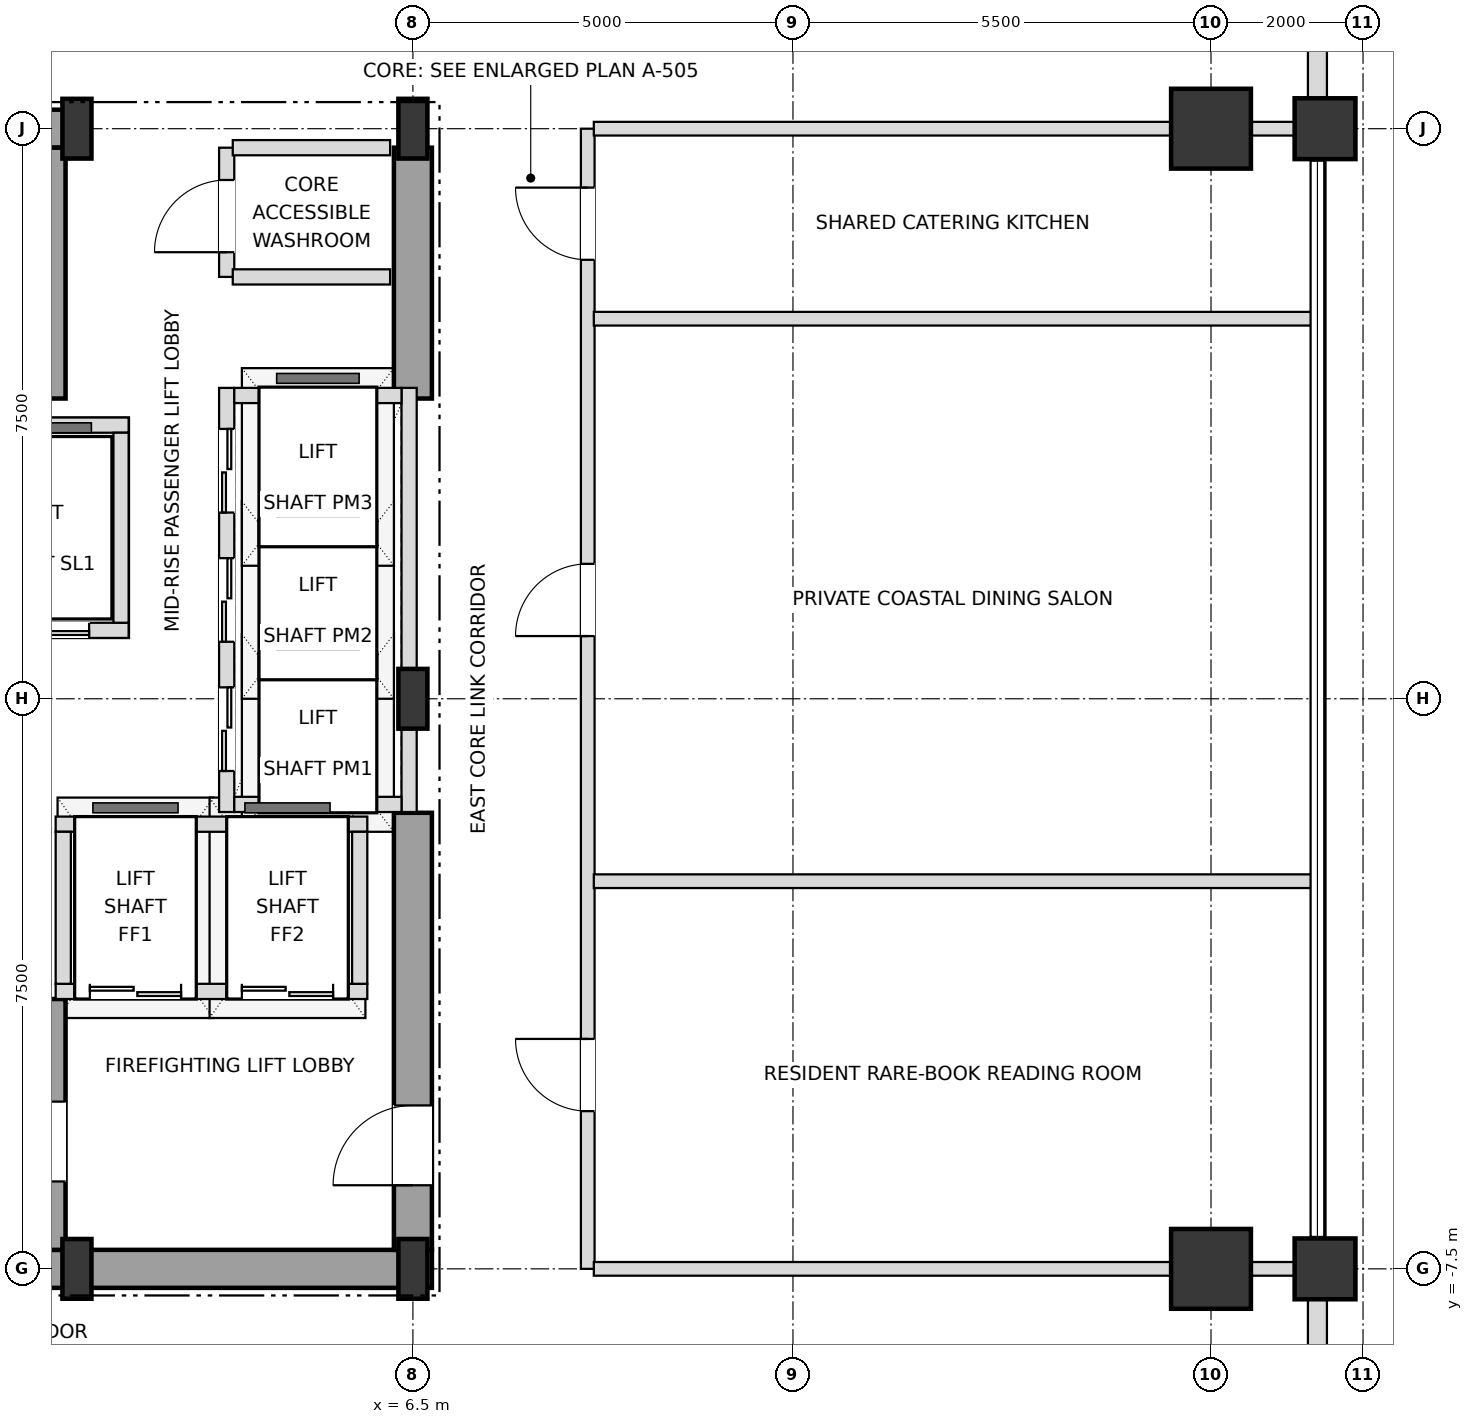
"""IFC4 building model, lengths in metres.
Left out: names, types, materials, properties, quantities, classifications, styles, units other than length and angle.
Written with IfcOpenShell. Run it as: python <this file> out.ifc"""

import sys

from ifc_helpers import new_model, si_unit, direction, frame, frame_2d, origin, origin_2d, place, context, subcontext, project, spatial, rectangle, i_section, extrude, element, fill, save


model = new_model("IFC4")
c1 = context("Model", 3, precision=1e-05, world=origin(), true_north=direction((0.0, 1.0)))
c2 = subcontext(c1, "Body", "Model", "MODEL_VIEW")
j1 = project(units=[si_unit("LENGTHUNIT", "METRE"), si_unit("PLANEANGLEUNIT", "RADIAN")], contexts=[c1])
p1 = place(None, origin())
s1 = spatial("IfcSite", under=j1, at=p1, CompositionType="ELEMENT")
p2 = place(p1, origin())
s2 = spatial("IfcBuilding", under=s1, at=p2, CompositionType="ELEMENT")
p3 = place(p2, frame((0.0, 0.0, 205.2)))
s3 = spatial("IfcBuildingStorey", under=s2, at=p3, CompositionType="ELEMENT", Elevation=205.2)
for number, where, z_axis, x_axis in (
    (1, (2.08, -7.5, 0.0), (0.0, 0.0, 1.0), (1.0, 0.0, 0.0)),
    (2, (6.5, -7.5, 0.0), (0.0, 0.0, 1.0), (1.0, 0.0, 0.0)),
    (3, (6.5, 0.0, 0.0), (0.0, 0.0, 1.0), (1.0, 0.0, 0.0)),
    (4, (2.08, 7.5, 0.0), (0.0, 0.0, 1.0), (1.0, 0.0, 0.0)),
    (5, (6.5, 7.5, 0.0), (0.0, 0.0, 1.0), (1.0, 0.0, 0.0)),
):
    element("IfcColumn", number, at=place(p3, frame(where, z_axis=z_axis, x_axis=x_axis)), inside=s3, PredefinedType="COLUMN", context=c2, shape_type="SweptSolid", body=[
        extrude(i_section(OverallWidth=0.382, OverallDepth=0.786, WebThickness=0.02, FlangeThickness=0.033, at=origin_2d()), origin(), (0.0, 0.0, 1.0), 3.6),
    ])
for number, where, z_axis, x_axis in (
    (6, (17.0, -7.5, 0.0), (0.0, 0.0, 1.0), (1.0, 0.0, 0.0)),
    (7, (17.0, 7.5, 0.0), (0.0, 0.0, 1.0), (1.0, 0.0, 0.0)),
):
    element("IfcColumn", number, at=place(p3, frame(where, z_axis=z_axis, x_axis=x_axis)), inside=s3, PredefinedType="USERDEFINED", context=c2, shape_type="SweptSolid", body=[
        extrude(rectangle(XDim=1.05, YDim=1.05, at=origin_2d()), origin(), (0.0, 0.0, 1.0), 3.6),
    ])
for number, where, z_axis, x_axis in (
    (8, (18.5, -7.5, 0.0), (0.0, 0.0, 1.0), (1.0, 0.0, 0.0)),
    (9, (18.5, 7.5, 0.0), (0.0, 0.0, 1.0), (1.0, 0.0, 0.0)),
):
    element("IfcColumn", number, at=place(p3, frame(where, z_axis=z_axis, x_axis=x_axis)), inside=s3, PredefinedType="COLUMN", context=c2, shape_type="SweptSolid", body=[
        extrude(rectangle(XDim=0.8, YDim=0.8, at=origin_2d()), origin(), (0.0, 0.0, 1.0), 3.6),
    ])
p4 = place(p3, frame((18.4, -12.605, 0.0), z_axis=(0.0, 0.0, 1.0), x_axis=(0.0, 1.0, 0.0)))
e10 = element("IfcWall", 10, at=p4, inside=s3, PredefinedType="SOLIDWALL", context=c2, shape_type="SweptSolid", body=[
    extrude(rectangle(XDim=4.71, YDim=0.25, at=frame_2d((2.355, 0.0))), origin(), (0.0, 0.0, 1.0), 2.748),
])
p5 = place(p4, frame((1.455, 0.0, 0.72)))
e11 = element("IfcOpeningElement", 11, at=p5, cuts=e10, PredefinedType="OPENING", context=c2, shape_type="SweptSolid", body=[
    extrude(rectangle(XDim=1.8, YDim=1.68, at=frame_2d((0.9, 0.84))), frame((0.0, 0.135, 0.0), z_axis=(0.0, -1.0, 0.0), x_axis=(1.0, 0.0, 0.0)), (0.0, 0.0, 1.0), 0.27),
])
p6 = place(p3, frame((18.4, 7.895, 0.0), z_axis=(0.0, 0.0, 1.0), x_axis=(0.0, 1.0, 0.0)))
e12 = element("IfcWall", 12, at=p6, inside=s3, PredefinedType="SOLIDWALL", context=c2, shape_type="SweptSolid", body=[
    extrude(rectangle(XDim=4.71, YDim=0.25, at=frame_2d((2.355, 0.0))), origin(), (0.0, 0.0, 1.0), 2.748),
])
p7 = place(p6, frame((1.455, 0.0, 0.72)))
e13 = element("IfcOpeningElement", 13, at=p7, cuts=e12, PredefinedType="OPENING", context=c2, shape_type="SweptSolid", body=[
    extrude(rectangle(XDim=1.8, YDim=1.68, at=frame_2d((0.9, 0.84))), frame((0.0, 0.135, 0.0), z_axis=(0.0, -1.0, 0.0), x_axis=(1.0, 0.0, 0.0)), (0.0, 0.0, 1.0), 0.27),
])
p8 = place(p3, frame((0.0, -7.5, 0.0), z_axis=(0.0, 0.0, 1.0), x_axis=(1.0, 0.0, 0.0)))
e14 = element("IfcWall", 14, at=p8, inside=s3, PredefinedType="SHEAR", context=c2, shape_type="SweptSolid", body=[
    extrude(rectangle(XDim=6.75, YDim=0.5, at=frame_2d((3.375, 0.0))), origin(), (0.0, 0.0, 1.0), 3.38),
])
p9 = place(p3, frame((0.0, 7.5, 0.0), z_axis=(0.0, 0.0, 1.0), x_axis=(1.0, 0.0, 0.0)))
e15 = element("IfcWall", 15, at=p9, inside=s3, PredefinedType="SHEAR", context=c2, shape_type="SweptSolid", body=[
    extrude(rectangle(XDim=2.08, YDim=0.5, at=frame_2d((1.04, 0.0))), origin(), (0.0, 0.0, 1.0), 3.38),
])
p10 = place(p3, frame((6.5, -7.25, 0.0), z_axis=(0.0, 0.0, 1.0), x_axis=(0.0, 1.0, 0.0)))
e16 = element("IfcWall", 16, at=p10, inside=s3, PredefinedType="SHEAR", context=c2, shape_type="SweptSolid", body=[
    extrude(rectangle(XDim=5.75, YDim=0.5, at=frame_2d((2.875, 0.0))), origin(), (0.0, 0.0, 1.0), 3.38),
])
p11 = place(p10, frame((0.85, 0.0, 0.0)))
e17 = element("IfcOpeningElement", 17, at=p11, cuts=e16, PredefinedType="OPENING", context=c2, shape_type="SweptSolid", body=[
    extrude(rectangle(XDim=1.05, YDim=2.15, at=frame_2d((0.525, 1.075))), frame((0.0, 0.26, 0.0), z_axis=(0.0, -1.0, 0.0), x_axis=(1.0, 0.0, 0.0)), (0.0, 0.0, 1.0), 0.52),
])
p12 = place(p3, frame((6.5, 3.95, 0.0), z_axis=(0.0, 0.0, 1.0), x_axis=(0.0, 1.0, 0.0)))
e18 = element("IfcWall", 18, at=p12, inside=s3, PredefinedType="SHEAR", context=c2, shape_type="SweptSolid", body=[
    extrude(rectangle(XDim=3.3, YDim=0.5, at=frame_2d((1.65, 0.0))), origin(), (0.0, 0.0, 1.0), 3.38),
])
p13 = place(p3, frame((1.73, -7.25, 0.0), z_axis=(0.0, 0.0, 1.0), x_axis=(0.0, 1.0, 0.0)))
e19 = element("IfcWall", 19, at=p13, inside=s3, PredefinedType="SHEAR", context=c2, shape_type="SweptSolid", body=[
    extrude(rectangle(XDim=3.3, YDim=0.4, at=frame_2d((1.65, 0.0))), origin(), (0.0, 0.0, 1.0), 3.38),
])
p14 = place(p13, frame((0.9, 0.0, 0.0)))
e20 = element("IfcOpeningElement", 20, at=p14, cuts=e19, PredefinedType="OPENING", context=c2, shape_type="SweptSolid", body=[
    extrude(rectangle(XDim=1.05, YDim=2.15, at=frame_2d((0.525, 1.075))), frame((0.0, 0.21, 0.0), z_axis=(0.0, -1.0, 0.0), x_axis=(1.0, 0.0, 0.0)), (0.0, 0.0, 1.0), 0.42),
])
p15 = place(p3, frame((1.73, 3.95, 0.0), z_axis=(0.0, 0.0, 1.0), x_axis=(0.0, 1.0, 0.0)))
e21 = element("IfcWall", 21, at=p15, inside=s3, PredefinedType="SHEAR", context=c2, shape_type="SweptSolid", body=[
    extrude(rectangle(XDim=3.3, YDim=0.4, at=frame_2d((1.65, 0.0))), origin(), (0.0, 0.0, 1.0), 3.38),
])
p16 = place(p3, frame((4.05, -1.49, 0.0), z_axis=(0.0, 0.0, 1.0), x_axis=(0.0, 1.0, 0.0)))
e22 = element("IfcWall", 22, at=p16, inside=s3, PredefinedType="SOLIDWALL", context=c2, shape_type="SweptSolid", body=[
    extrude(rectangle(XDim=5.58, YDim=0.2, at=frame_2d((2.79, 0.0))), origin(), (0.0, 0.0, 1.0), 3.38),
])
p17 = place(p16, frame((0.54, 0.0, 0.0)))
e23 = element("IfcOpeningElement", 23, at=p17, cuts=e22, PredefinedType="OPENING", context=c2, shape_type="SweptSolid", body=[
    extrude(rectangle(XDim=1.1, YDim=2.15, at=frame_2d((0.55, 1.075))), frame((0.0, 0.11, 0.0), z_axis=(0.0, -1.0, 0.0), x_axis=(1.0, 0.0, 0.0)), (0.0, 0.0, 1.0), 0.22),
])
p18 = place(p16, frame((2.24, 0.0, 0.0)))
e24 = element("IfcOpeningElement", 24, at=p18, cuts=e22, PredefinedType="OPENING", context=c2, shape_type="SweptSolid", body=[
    extrude(rectangle(XDim=1.1, YDim=2.15, at=frame_2d((0.55, 1.075))), frame((0.0, 0.11, 0.0), z_axis=(0.0, -1.0, 0.0), x_axis=(1.0, 0.0, 0.0)), (0.0, 0.0, 1.0), 0.22),
])
p19 = place(p16, frame((3.94, 0.0, 0.0)))
e25 = element("IfcOpeningElement", 25, at=p19, cuts=e22, PredefinedType="OPENING", context=c2, shape_type="SweptSolid", body=[
    extrude(rectangle(XDim=1.1, YDim=2.15, at=frame_2d((0.55, 1.075))), frame((0.0, 0.11, 0.0), z_axis=(0.0, -1.0, 0.0), x_axis=(1.0, 0.0, 0.0)), (0.0, 0.0, 1.0), 0.22),
])
p20 = place(p3, frame((6.45, -1.49, 0.0), z_axis=(0.0, 0.0, 1.0), x_axis=(0.0, 1.0, 0.0)))
e26 = element("IfcWall", 26, at=p20, inside=s3, PredefinedType="SOLIDWALL", context=c2, shape_type="SweptSolid", body=[
    extrude(rectangle(XDim=5.58, YDim=0.2, at=frame_2d((2.79, 0.0))), origin(), (0.0, 0.0, 1.0), 2.826),
])
for number, where, z_axis, x_axis in (
    (27, (4.15, -1.39, 0.0), (0.0, 0.0, 1.0), (1.0, 0.0, 0.0)),
    (28, (4.15, 3.99, 0.0), (0.0, 0.0, 1.0), (1.0, 0.0, 0.0)),
):
    element("IfcWall", number, at=place(p3, frame(where, z_axis=z_axis, x_axis=x_axis)), inside=s3, PredefinedType="SOLIDWALL", context=c2, shape_type="SweptSolid", body=[
        extrude(rectangle(XDim=2.2, YDim=0.2, at=frame_2d((1.1, 0.0))), origin(), (0.0, 0.0, 1.0), 3.38),
    ])
p21 = place(p3, frame((-2.82, 0.9, 0.0), z_axis=(0.0, 0.0, 1.0), x_axis=(1.0, 0.0, 0.0)))
e29 = element("IfcWall", 29, at=p21, inside=s3, PredefinedType="SOLIDWALL", context=c2, shape_type="SweptSolid", body=[
    extrude(rectangle(XDim=5.58, YDim=0.2, at=frame_2d((2.79, 0.0))), origin(), (0.0, 0.0, 1.0), 3.38),
])
p22 = place(p21, frame((3.86, 0.0, 0.0)))
e30 = element("IfcOpeningElement", 30, at=p22, cuts=e29, PredefinedType="OPENING", context=c2, shape_type="SweptSolid", body=[
    extrude(rectangle(XDim=1.2, YDim=2.2, at=frame_2d((0.6, 1.1))), frame((0.0, 0.11, 0.0), z_axis=(0.0, -1.0, 0.0), x_axis=(1.0, 0.0, 0.0)), (0.0, 0.0, 1.0), 0.22),
])
p23 = place(p3, frame((-2.82, 3.6, 0.0), z_axis=(0.0, 0.0, 1.0), x_axis=(1.0, 0.0, 0.0)))
e31 = element("IfcWall", 31, at=p23, inside=s3, PredefinedType="SOLIDWALL", context=c2, shape_type="SweptSolid", body=[
    extrude(rectangle(XDim=5.58, YDim=0.2, at=frame_2d((2.79, 0.0))), origin(), (0.0, 0.0, 1.0), 3.38),
])
p24 = place(p3, frame((2.66, 1.0, 0.0), z_axis=(0.0, 0.0, 1.0), x_axis=(0.0, 1.0, 0.0)))
e32 = element("IfcWall", 32, at=p24, inside=s3, PredefinedType="SOLIDWALL", context=c2, shape_type="SweptSolid", body=[
    extrude(rectangle(XDim=2.5, YDim=0.2, at=frame_2d((1.25, 0.0))), origin(), (0.0, 0.0, 1.0), 3.38),
])
p25 = place(p3, frame((1.8, -3.85, 0.0), z_axis=(0.0, 0.0, 1.0), x_axis=(1.0, 0.0, 0.0)))
e33 = element("IfcWall", 33, at=p25, inside=s3, PredefinedType="SOLIDWALL", context=c2, shape_type="SweptSolid", body=[
    extrude(rectangle(XDim=4.1, YDim=0.2, at=frame_2d((2.05, 0.0))), origin(), (0.0, 0.0, 1.0), 3.38),
])
p26 = place(p25, frame((0.45, 0.0, 0.0)))
e34 = element("IfcOpeningElement", 34, at=p26, cuts=e33, PredefinedType="OPENING", context=c2, shape_type="SweptSolid", body=[
    extrude(rectangle(XDim=1.2, YDim=2.2, at=frame_2d((0.6, 1.1))), frame((0.0, 0.11, 0.0), z_axis=(0.0, -1.0, 0.0), x_axis=(1.0, 0.0, 0.0)), (0.0, 0.0, 1.0), 0.22),
])
p27 = place(p25, frame((2.45, 0.0, 0.0)))
e35 = element("IfcOpeningElement", 35, at=p27, cuts=e33, PredefinedType="OPENING", context=c2, shape_type="SweptSolid", body=[
    extrude(rectangle(XDim=1.2, YDim=2.2, at=frame_2d((0.6, 1.1))), frame((0.0, 0.11, 0.0), z_axis=(0.0, -1.0, 0.0), x_axis=(1.0, 0.0, 0.0)), (0.0, 0.0, 1.0), 0.22),
])
p28 = place(p3, frame((1.8, -1.65, 0.0), z_axis=(0.0, 0.0, 1.0), x_axis=(1.0, 0.0, 0.0)))
e36 = element("IfcWall", 36, at=p28, inside=s3, PredefinedType="SOLIDWALL", context=c2, shape_type="SweptSolid", body=[
    extrude(rectangle(XDim=4.1, YDim=0.2, at=frame_2d((2.05, 0.0))), origin(), (0.0, 0.0, 1.0), 3.38),
])
for number, where, z_axis, x_axis in (
    (37, (1.9, -3.75, 0.0), (0.0, 0.0, 1.0), (0.0, 1.0, 0.0)),
    (38, (5.8, -3.75, 0.0), (0.0, 0.0, 1.0), (0.0, 1.0, 0.0)),
):
    element("IfcWall", number, at=place(p3, frame(where, z_axis=z_axis, x_axis=x_axis)), inside=s3, PredefinedType="SOLIDWALL", context=c2, shape_type="SweptSolid", body=[
        extrude(rectangle(XDim=2.0, YDim=0.2, at=frame_2d((1.0, 0.0))), origin(), (0.0, 0.0, 1.0), 3.38),
    ])
p29 = place(p3, frame((4.05, 5.55, 0.0), z_axis=(0.0, 0.0, 1.0), x_axis=(0.0, 1.0, 0.0)))
e39 = element("IfcWall", 39, at=p29, inside=s3, PredefinedType="SOLIDWALL", context=c2, shape_type="SweptSolid", body=[
    extrude(rectangle(XDim=1.7, YDim=0.2, at=frame_2d((0.85, 0.0))), origin(), (0.0, 0.0, 1.0), 3.38),
])
p30 = place(p29, frame((0.325, 0.0, 0.0)))
e40 = element("IfcOpeningElement", 40, at=p30, cuts=e39, PredefinedType="OPENING", context=c2, shape_type="SweptSolid", body=[
    extrude(rectangle(XDim=0.95, YDim=2.15, at=frame_2d((0.475, 1.075))), frame((0.0, 0.11, 0.0), z_axis=(0.0, -1.0, 0.0), x_axis=(1.0, 0.0, 0.0)), (0.0, 0.0, 1.0), 0.22),
])
p31 = place(p3, frame((8.8, -7.5, 0.0), z_axis=(0.0, 0.0, 1.0), x_axis=(0.0, 1.0, 0.0)))
e41 = element("IfcWall", 41, at=p31, inside=s3, PredefinedType="PARTITIONING", context=c2, shape_type="SweptSolid", body=[
    extrude(rectangle(XDim=15.0, YDim=0.18, at=frame_2d((7.5, 0.0))), origin(), (0.0, 0.0, 1.0), 3.38),
])
p32 = place(p31, frame((2.075, 0.0, 0.0)))
e42 = element("IfcOpeningElement", 42, at=p32, cuts=e41, PredefinedType="OPENING", context=c2, shape_type="SweptSolid", body=[
    extrude(rectangle(XDim=0.95, YDim=2.15, at=frame_2d((0.475, 1.075))), frame((0.0, 0.1, 0.0), z_axis=(0.0, -1.0, 0.0), x_axis=(1.0, 0.0, 0.0)), (0.0, 0.0, 1.0), 0.2),
])
p33 = place(p31, frame((8.325, 0.0, 0.0)))
e43 = element("IfcOpeningElement", 43, at=p33, cuts=e41, PredefinedType="OPENING", context=c2, shape_type="SweptSolid", body=[
    extrude(rectangle(XDim=0.95, YDim=2.15, at=frame_2d((0.475, 1.075))), frame((0.0, 0.1, 0.0), z_axis=(0.0, -1.0, 0.0), x_axis=(1.0, 0.0, 0.0)), (0.0, 0.0, 1.0), 0.2),
])
p34 = place(p31, frame((13.275, 0.0, 0.0)))
e44 = element("IfcOpeningElement", 44, at=p34, cuts=e41, PredefinedType="OPENING", context=c2, shape_type="SweptSolid", body=[
    extrude(rectangle(XDim=0.95, YDim=2.15, at=frame_2d((0.475, 1.075))), frame((0.0, 0.1, 0.0), z_axis=(0.0, -1.0, 0.0), x_axis=(1.0, 0.0, 0.0)), (0.0, 0.0, 1.0), 0.2),
])
p35 = place(p3, frame((8.88, -7.5, 0.0), z_axis=(0.0, 0.0, 1.0), x_axis=(1.0, 0.0, 0.0)))
e45 = element("IfcWall", 45, at=p35, inside=s3, PredefinedType="PARTITIONING", context=c2, shape_type="SweptSolid", body=[
    extrude(rectangle(XDim=9.52, YDim=0.18, at=frame_2d((4.76, 0.0))), origin(), (0.0, 0.0, 1.0), 2.826),
])
for number, where, z_axis, x_axis in (
    (46, (8.88, -2.4, 0.0), (0.0, 0.0, 1.0), (1.0, 0.0, 0.0)),
    (47, (8.88, 5.0, 0.0), (0.0, 0.0, 1.0), (1.0, 0.0, 0.0)),
):
    element("IfcWall", number, at=place(p3, frame(where, z_axis=z_axis, x_axis=x_axis)), inside=s3, PredefinedType="PARTITIONING", context=c2, shape_type="SweptSolid", body=[
        extrude(rectangle(XDim=9.44, YDim=0.18, at=frame_2d((4.72, 0.0))), origin(), (0.0, 0.0, 1.0), 2.826),
    ])
for number, where, z_axis, x_axis in (
    (48, (4.13, 5.55, 0.0), (0.0, 0.0, 1.0), (1.0, 0.0, 0.0)),
    (49, (4.13, 7.25, 0.0), (0.0, 0.0, 1.0), (1.0, 0.0, 0.0)),
):
    element("IfcWall", number, at=place(p3, frame(where, z_axis=z_axis, x_axis=x_axis)), inside=s3, PredefinedType="SOLIDWALL", context=c2, shape_type="SweptSolid", body=[
        extrude(rectangle(XDim=2.07, YDim=0.2, at=frame_2d((1.035, 0.0))), origin(), (0.0, 0.0, 1.0), 3.38),
    ])
p36 = place(p3, frame((8.88, 7.5, 0.0), z_axis=(0.0, 0.0, 1.0), x_axis=(1.0, 0.0, 0.0)))
e50 = element("IfcWall", 50, at=p36, inside=s3, PredefinedType="PARTITIONING", context=c2, shape_type="SweptSolid", body=[
    extrude(rectangle(XDim=9.52, YDim=0.18, at=frame_2d((4.76, 0.0))), origin(), (0.0, 0.0, 1.0), 2.826),
])
p37 = place(p11, origin())
e51 = element("IfcDoor", 51, at=p37, inside=s3, OperationType="SINGLE_SWING_LEFT", PredefinedType="DOOR", context=c2, shape_type="SweptSolid", body=[
    extrude(rectangle(XDim=1.05, YDim=2.15, at=frame_2d((0.525, 1.075))), frame((0.0, 0.025, 0.0), z_axis=(0.0, -1.0, 0.0), x_axis=(1.0, 0.0, 0.0)), (0.0, 0.0, 1.0), 0.05),
])
fill(e17, e51)
p38 = place(p17, origin())
e52 = element("IfcDoor", 52, at=p38, inside=s3, OperationType="DOUBLE_DOOR_SLIDING", PredefinedType="DOOR", context=c2, shape_type="SweptSolid", body=[
    extrude(rectangle(XDim=1.1, YDim=2.15, at=frame_2d((0.55, 1.075))), frame((0.0, 0.025, 0.0), z_axis=(0.0, -1.0, 0.0), x_axis=(1.0, 0.0, 0.0)), (0.0, 0.0, 1.0), 0.05),
])
fill(e23, e52)
p39 = place(p18, origin())
e53 = element("IfcDoor", 53, at=p39, inside=s3, OperationType="DOUBLE_DOOR_SLIDING", PredefinedType="DOOR", context=c2, shape_type="SweptSolid", body=[
    extrude(rectangle(XDim=1.1, YDim=2.15, at=frame_2d((0.55, 1.075))), frame((0.0, 0.025, 0.0), z_axis=(0.0, -1.0, 0.0), x_axis=(1.0, 0.0, 0.0)), (0.0, 0.0, 1.0), 0.05),
])
fill(e24, e53)
p40 = place(p19, origin())
e54 = element("IfcDoor", 54, at=p40, inside=s3, OperationType="DOUBLE_DOOR_SLIDING", PredefinedType="DOOR", context=c2, shape_type="SweptSolid", body=[
    extrude(rectangle(XDim=1.1, YDim=2.15, at=frame_2d((0.55, 1.075))), frame((0.0, 0.025, 0.0), z_axis=(0.0, -1.0, 0.0), x_axis=(1.0, 0.0, 0.0)), (0.0, 0.0, 1.0), 0.05),
])
fill(e25, e54)
p41 = place(p22, origin())
e55 = element("IfcDoor", 55, at=p41, inside=s3, OperationType="DOUBLE_DOOR_SLIDING", PredefinedType="DOOR", context=c2, shape_type="SweptSolid", body=[
    extrude(rectangle(XDim=1.2, YDim=2.2, at=frame_2d((0.6, 1.1))), frame((0.0, 0.025, 0.0), z_axis=(0.0, -1.0, 0.0), x_axis=(1.0, 0.0, 0.0)), (0.0, 0.0, 1.0), 0.05),
])
fill(e30, e55)
p42 = place(p26, origin())
e56 = element("IfcDoor", 56, at=p42, inside=s3, OperationType="DOUBLE_DOOR_SLIDING", PredefinedType="DOOR", context=c2, shape_type="SweptSolid", body=[
    extrude(rectangle(XDim=1.2, YDim=2.2, at=frame_2d((0.6, 1.1))), frame((0.0, 0.025, 0.0), z_axis=(0.0, -1.0, 0.0), x_axis=(1.0, 0.0, 0.0)), (0.0, 0.0, 1.0), 0.05),
])
fill(e34, e56)
p43 = place(p27, origin())
e57 = element("IfcDoor", 57, at=p43, inside=s3, OperationType="DOUBLE_DOOR_SLIDING", PredefinedType="DOOR", context=c2, shape_type="SweptSolid", body=[
    extrude(rectangle(XDim=1.2, YDim=2.2, at=frame_2d((0.6, 1.1))), frame((0.0, 0.025, 0.0), z_axis=(0.0, -1.0, 0.0), x_axis=(1.0, 0.0, 0.0)), (0.0, 0.0, 1.0), 0.05),
])
fill(e35, e57)
p44 = place(p30, origin())
e58 = element("IfcDoor", 58, at=p44, inside=s3, OperationType="SINGLE_SWING_LEFT", PredefinedType="DOOR", context=c2, shape_type="SweptSolid", body=[
    extrude(rectangle(XDim=0.95, YDim=2.15, at=frame_2d((0.475, 1.075))), frame((0.0, 0.025, 0.0), z_axis=(0.0, -1.0, 0.0), x_axis=(1.0, 0.0, 0.0)), (0.0, 0.0, 1.0), 0.05),
])
fill(e40, e58)
p45 = place(p32, origin())
e59 = element("IfcDoor", 59, at=p45, inside=s3, OperationType="SINGLE_SWING_RIGHT", PredefinedType="DOOR", context=c2, shape_type="SweptSolid", body=[
    extrude(rectangle(XDim=0.95, YDim=2.15, at=frame_2d((0.475, 1.075))), frame((0.0, 0.025, 0.0), z_axis=(0.0, -1.0, 0.0), x_axis=(1.0, 0.0, 0.0)), (0.0, 0.0, 1.0), 0.05),
])
fill(e42, e59)
p46 = place(p33, origin())
e60 = element("IfcDoor", 60, at=p46, inside=s3, OperationType="SINGLE_SWING_LEFT", PredefinedType="DOOR", context=c2, shape_type="SweptSolid", body=[
    extrude(rectangle(XDim=0.95, YDim=2.15, at=frame_2d((0.475, 1.075))), frame((0.0, 0.025, 0.0), z_axis=(0.0, -1.0, 0.0), x_axis=(1.0, 0.0, 0.0)), (0.0, 0.0, 1.0), 0.05),
])
fill(e43, e60)
p47 = place(p34, origin())
e61 = element("IfcDoor", 61, at=p47, inside=s3, OperationType="SINGLE_SWING_RIGHT", PredefinedType="DOOR", context=c2, shape_type="SweptSolid", body=[
    extrude(rectangle(XDim=0.95, YDim=2.15, at=frame_2d((0.475, 1.075))), frame((0.0, 0.025, 0.0), z_axis=(0.0, -1.0, 0.0), x_axis=(1.0, 0.0, 0.0)), (0.0, 0.0, 1.0), 0.05),
])
fill(e44, e61)
save(model, sys.argv[1])
